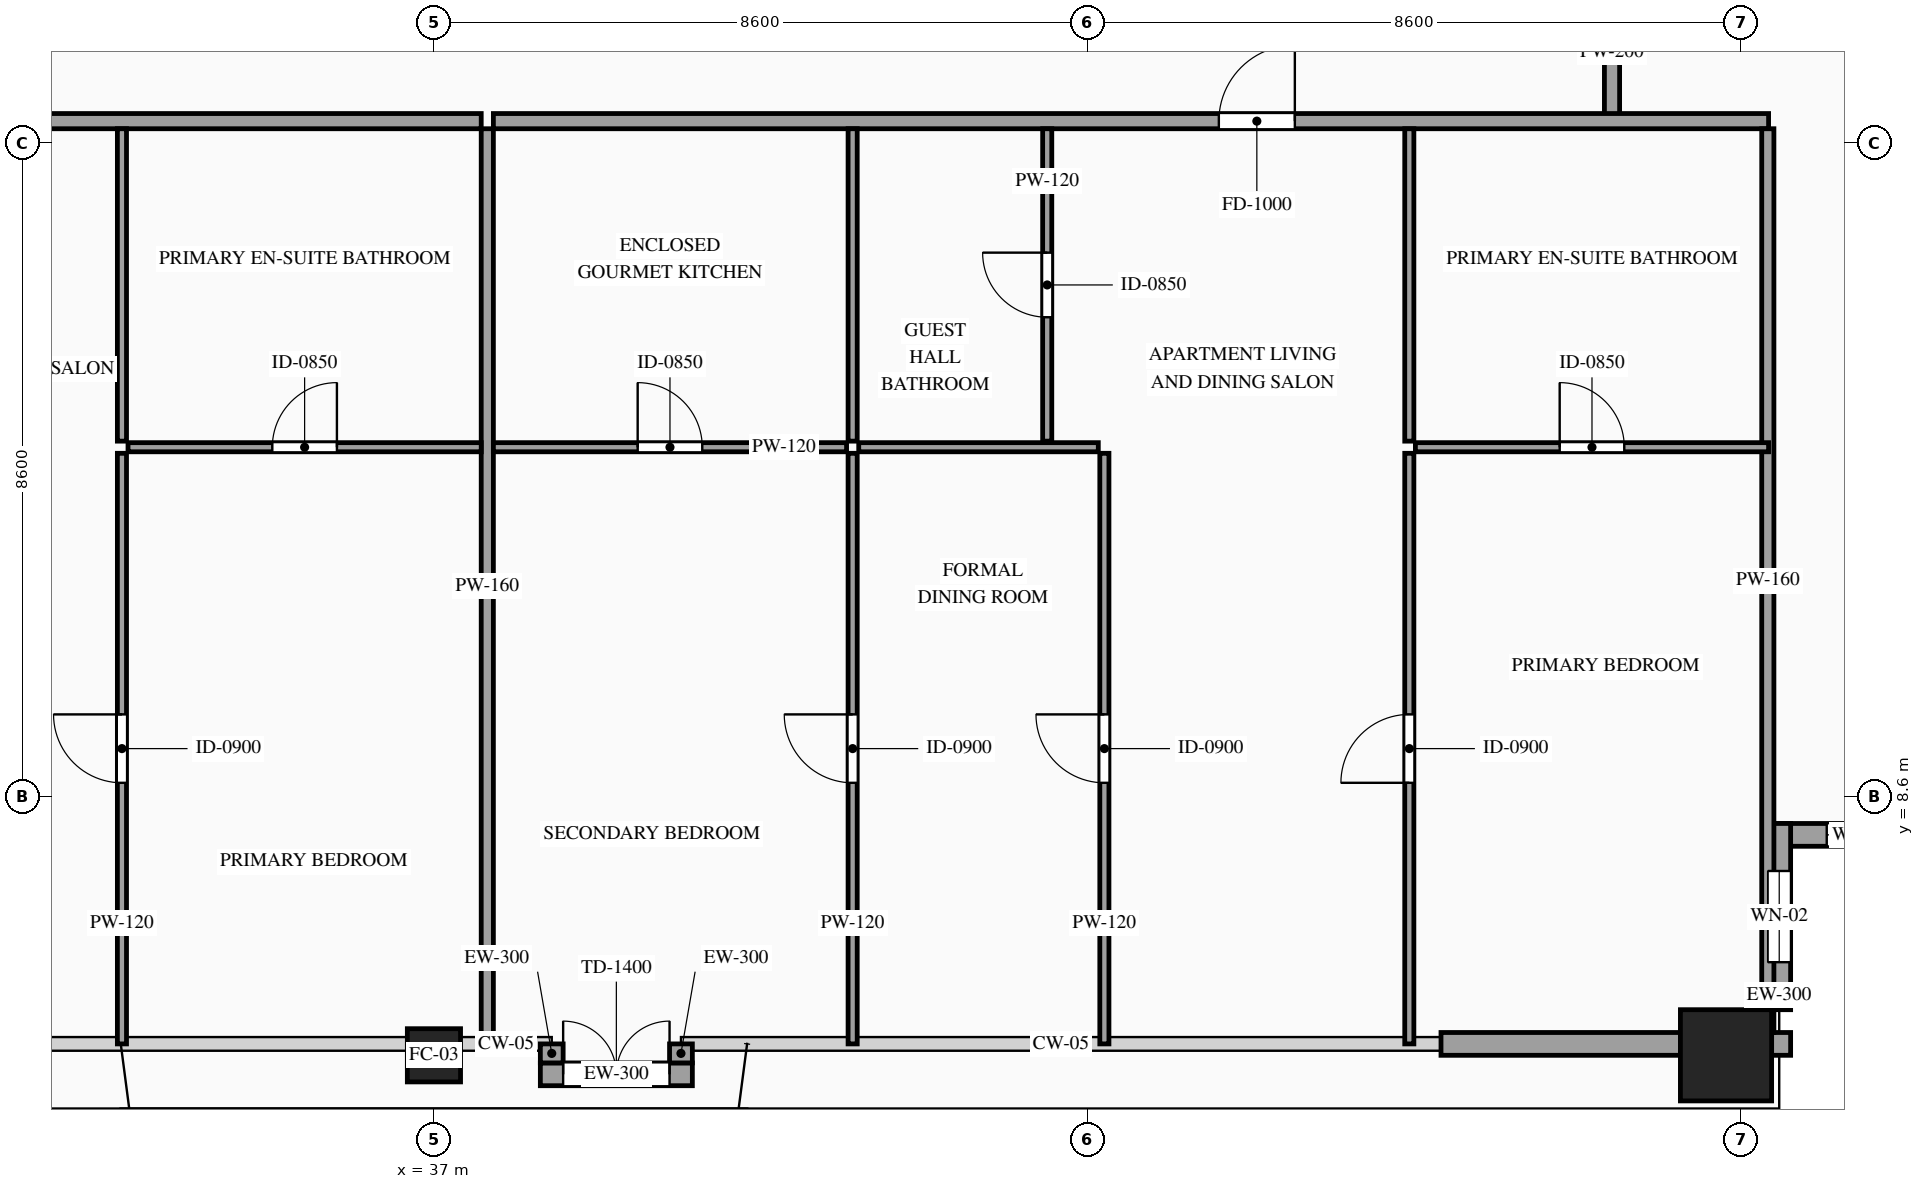
"""IFC4 building model, lengths in metres.
Left out: names, types, materials, properties, quantities, classifications, styles, units other than length and angle.
Written with IfcOpenShell. Run it as: python <this file> out.ifc"""

import sys

from ifc_helpers import new_model, si_unit, direction, frame, frame_2d, origin, origin_2d, place, context, subcontext, project, spatial, rectangle, hollow_rectangle, extrude, source, transform, mapped, element, fill, save


model = new_model("IFC4")
c1 = context("Model", 3, precision=1e-05, world=origin(), true_north=direction((0.0, 1.0)))
c2 = subcontext(c1, "Body", "Model", "MODEL_VIEW")
j1 = project(units=[si_unit("LENGTHUNIT", "METRE"), si_unit("PLANEANGLEUNIT", "RADIAN")], contexts=[c1])
p1 = place(None, origin())
s1 = spatial("IfcSite", under=j1, at=p1, CompositionType="ELEMENT")
p2 = place(p1, origin())
s2 = spatial("IfcBuilding", under=s1, at=p2, CompositionType="ELEMENT")
p3 = place(p2, frame((0.0, 0.0, 278.6)))
s3 = spatial("IfcBuildingStorey", under=s2, at=p3, CompositionType="ELEMENT", Elevation=278.6)
m1 = source(origin(), c2, "Body", "SweptSolid", [
    extrude(hollow_rectangle(XDim=0.7, YDim=0.7, WallThickness=0.032, at=origin_2d()), origin(), (0.0, 0.0, 1.0), 3.5),
])
p4 = place(p3, frame((37.0, 5.2, 0.0), z_axis=(0.0, 0.0, 1.0), x_axis=(1.0, 0.0, 0.0)))
e1 = element("IfcColumn", 1, at=p4, inside=s3, PredefinedType="COLUMN", context=c2, shape_type="MappedRepresentation", body=[
    mapped(m1, transform((0.0, 0.0, 0.0), scale=1.0)),
])
m2 = source(origin(), c2, "Body", "SweptSolid", [
    extrude(hollow_rectangle(XDim=1.2, YDim=1.2, WallThickness=0.055, at=origin_2d()), origin(), (0.0, 0.0, 1.0), 3.5),
])
p5 = place(p3, frame((54.0, 5.2, 0.0), z_axis=(0.0, 0.0, 1.0), x_axis=(1.0, 0.0, 0.0)))
e2 = element("IfcColumn", 2, at=p5, inside=s3, PredefinedType="COLUMN", context=c2, shape_type="MappedRepresentation", body=[
    mapped(m2, transform((0.0, 0.0, 0.0), scale=1.0)),
])
p6 = place(p3, frame((54.55, 8.1, 0.0), z_axis=(0.0, 0.0, 1.0), x_axis=(1.0, 0.0, 0.0)))
e3 = element("IfcWall", 3, at=p6, inside=s3, PredefinedType="SOLIDWALL", context=c2, shape_type="SweptSolid", body=[
    extrude(rectangle(XDim=2.45, YDim=0.3, at=frame_2d((1.225, 0.0))), origin(), (0.0, 0.0, 1.0), 3.28),
])
p7 = place(p6, frame((0.775, 0.0, 0.85)))
e4 = element("IfcOpeningElement", 4, at=p7, cuts=e3, PredefinedType="OPENING", context=c2, shape_type="SweptSolid", body=[
    extrude(rectangle(XDim=0.9, YDim=1.5, at=frame_2d((0.45, 0.75))), frame((0.0, 0.165, 0.0), z_axis=(0.0, -1.0, 0.0), x_axis=(1.0, 0.0, 0.0)), (0.0, 0.0, 1.0), 0.33),
])
p8 = place(p3, frame((54.7, 5.8, 0.0), z_axis=(0.0, 0.0, 1.0), x_axis=(0.0, 1.0, 0.0)))
e5 = element("IfcWall", 5, at=p8, inside=s3, PredefinedType="SOLIDWALL", context=c2, shape_type="SweptSolid", body=[
    extrude(rectangle(XDim=2.45, YDim=0.3, at=frame_2d((1.225, 0.0))), origin(), (0.0, 0.0, 1.0), 3.28),
])
p9 = place(p8, frame((0.625, 0.0, 0.85)))
e6 = element("IfcOpeningElement", 6, at=p9, cuts=e5, PredefinedType="OPENING", context=c2, shape_type="SweptSolid", body=[
    extrude(rectangle(XDim=1.2, YDim=2.1, at=frame_2d((0.6, 1.05))), frame((0.0, 0.165, 0.0), z_axis=(0.0, -1.0, 0.0), x_axis=(1.0, 0.0, 0.0)), (0.0, 0.0, 1.0), 0.33),
])
m3 = source(origin(), c2, "Body", "SweptSolid", [
    extrude(rectangle(XDim=0.25, YDim=0.3, at=frame_2d((0.125, 0.0))), origin(), (0.0, 0.0, 1.0), 3.28),
])
p10 = place(p3, frame((54.6, 5.35, 0.0), z_axis=(0.0, 0.0, 1.0), x_axis=(1.0, 0.0, 0.0)))
e7 = element("IfcWall", 7, at=p10, inside=s3, PredefinedType="SOLIDWALL", context=c2, shape_type="MappedRepresentation", body=[
    mapped(m3, transform((0.0, 0.0, 0.0), scale=1.0)),
])
m4 = source(origin(), c2, "Body", "SweptSolid", [
    extrude(rectangle(XDim=3.15, YDim=0.3, at=frame_2d((1.575, 0.0))), origin(), (0.0, 0.0, 1.0), 2.835),
])
p11 = place(p3, frame((50.25, 5.35, 0.0), z_axis=(0.0, 0.0, 1.0), x_axis=(1.0, 0.0, 0.0)))
e8 = element("IfcWall", 8, at=p11, inside=s3, PredefinedType="SOLIDWALL", context=c2, shape_type="MappedRepresentation", body=[
    mapped(m4, transform((0.0, 0.0, 0.0), scale=1.0)),
])
p12 = place(p3, frame((38.4, 4.95, 0.0), z_axis=(0.0, 0.0, 1.0), x_axis=(1.0, 0.0, 0.0)))
e9 = element("IfcWall", 9, at=p12, inside=s3, PredefinedType="SOLIDWALL", context=c2, shape_type="SweptSolid", body=[
    extrude(rectangle(XDim=2.0, YDim=0.3, at=frame_2d((1.0, 0.0))), origin(), (0.0, 0.0, 1.0), 2.835),
])
p13 = place(p12, frame((0.3, 0.0, 0.0)))
e10 = element("IfcOpeningElement", 10, at=p13, cuts=e9, PredefinedType="OPENING", context=c2, shape_type="SweptSolid", body=[
    extrude(rectangle(XDim=1.4, YDim=2.3, at=frame_2d((0.7, 1.15))), frame((0.0, 0.165, 0.0), z_axis=(0.0, -1.0, 0.0), x_axis=(1.0, 0.0, 0.0)), (0.0, 0.0, 1.0), 0.33),
])
for number, where, z_axis, x_axis in (
    (11, (38.55, 5.35, 0.0), (0.0, 0.0, 1.0), (0.0, -1.0, 0.0)),
    (12, (40.25, 5.1, 0.0), (0.0, 0.0, 1.0), (0.0, 1.0, 0.0)),
):
    element("IfcWall", number, at=place(p3, frame(where, z_axis=z_axis, x_axis=x_axis)), inside=s3, PredefinedType="SOLIDWALL", context=c2, shape_type="MappedRepresentation", body=[
        mapped(m3, transform((0.0, 0.0, 0.0), scale=1.0)),
    ])
m5 = source(origin(), c2, "Body", "SweptSolid", [
    extrude(rectangle(XDim=1.7, YDim=0.2, at=frame_2d((0.85, 0.0))), origin(), (0.0, 0.0, 1.0), 3.28),
])
p14 = place(p3, frame((52.5, 17.55, 0.0), z_axis=(0.0, 0.0, 1.0), x_axis=(0.0, 1.0, 0.0)))
e13 = element("IfcWall", 13, at=p14, inside=s3, PredefinedType="PARTITIONING", context=c2, shape_type="MappedRepresentation", body=[
    mapped(m5, transform((0.0, 0.0, 0.0), scale=1.0)),
])
p15 = place(p3, frame((19.44, 17.49, 0.0), z_axis=(0.0, 0.0, 1.0), x_axis=(1.0, 0.0, 0.0)))
e14 = element("IfcWall", 14, at=p15, inside=s3, PredefinedType="PARTITIONING", context=c2, shape_type="SweptSolid", body=[
    extrude(rectangle(XDim=18.182, YDim=0.2, at=frame_2d((9.091, 0.0))), origin(), (0.0, 0.0, 1.0), 3.28),
])
p16 = place(p15, frame((10.528, 0.0, 0.0)))
e15 = element("IfcOpeningElement", 15, at=p16, cuts=e14, PredefinedType="OPENING", context=c2, shape_type="SweptSolid", body=[
    extrude(rectangle(XDim=1.0, YDim=2.2, at=frame_2d((0.5, 1.1))), frame((0.0, 0.115, 0.0), z_axis=(0.0, -1.0, 0.0), x_axis=(1.0, 0.0, 0.0)), (0.0, 0.0, 1.0), 0.23),
])
m6 = source(origin(), c2, "Body", "SweptSolid", [
    extrude(rectangle(XDim=12.04, YDim=0.16, at=frame_2d((6.02, 0.0))), origin(), (0.0, 0.0, 1.0), 3.28),
])
p17 = place(p3, frame((37.702, 5.35, 0.0), z_axis=(0.0, 0.0, 1.0), x_axis=(0.0, 1.0, 0.0)))
e16 = element("IfcWall", 16, at=p17, inside=s3, PredefinedType="PARTITIONING", context=c2, shape_type="MappedRepresentation", body=[
    mapped(m6, transform((0.0, 0.0, 0.0), scale=1.0)),
])
p18 = place(p3, frame((32.975, 13.2, 0.0), z_axis=(0.0, 0.0, 1.0), x_axis=(1.0, 0.0, 0.0)))
e17 = element("IfcWall", 17, at=p18, inside=s3, PredefinedType="PARTITIONING", context=c2, shape_type="SweptSolid", body=[
    extrude(rectangle(XDim=4.647, YDim=0.12, at=frame_2d((2.323, 0.0))), origin(), (0.0, 0.0, 1.0), 3.28),
])
p19 = place(p18, frame((1.898, 0.0, 0.0)))
e18 = element("IfcOpeningElement", 18, at=p19, cuts=e17, PredefinedType="OPENING", context=c2, shape_type="SweptSolid", body=[
    extrude(rectangle(XDim=0.85, YDim=2.1, at=frame_2d((0.425, 1.05))), frame((0.0, 0.075, 0.0), z_axis=(0.0, -1.0, 0.0), x_axis=(1.0, 0.0, 0.0)), (0.0, 0.0, 1.0), 0.15),
])
m7 = source(origin(), c2, "Body", "SweptSolid", [
    extrude(rectangle(XDim=4.11, YDim=0.12, at=frame_2d((2.055, 0.0))), origin(), (0.0, 0.0, 1.0), 3.28),
])
p20 = place(p3, frame((32.895, 13.28, 0.0), z_axis=(0.0, 0.0, 1.0), x_axis=(0.0, 1.0, 0.0)))
e19 = element("IfcWall", 19, at=p20, inside=s3, PredefinedType="PARTITIONING", context=c2, shape_type="MappedRepresentation", body=[
    mapped(m7, transform((0.0, 0.0, 0.0), scale=1.0)),
])
p21 = place(p3, frame((32.895, 5.35, 0.0), z_axis=(0.0, 0.0, 1.0), x_axis=(0.0, 1.0, 0.0)))
e20 = element("IfcWall", 20, at=p21, inside=s3, PredefinedType="PARTITIONING", context=c2, shape_type="SweptSolid", body=[
    extrude(rectangle(XDim=7.77, YDim=0.12, at=frame_2d((3.885, 0.0))), origin(), (0.0, 0.0, 1.0), 3.28),
])
p22 = place(p21, frame((3.435, 0.0, 0.0)))
e21 = element("IfcOpeningElement", 21, at=p22, cuts=e20, PredefinedType="OPENING", context=c2, shape_type="SweptSolid", body=[
    extrude(rectangle(XDim=0.9, YDim=2.15, at=frame_2d((0.45, 1.075))), frame((0.0, 0.075, 0.0), z_axis=(0.0, -1.0, 0.0), x_axis=(1.0, 0.0, 0.0)), (0.0, 0.0, 1.0), 0.15),
])
p23 = place(p3, frame((37.782, 17.49, 0.0), z_axis=(0.0, 0.0, 1.0), x_axis=(1.0, 0.0, 0.0)))
e22 = element("IfcWall", 22, at=p23, inside=s3, PredefinedType="PARTITIONING", context=c2, shape_type="SweptSolid", body=[
    extrude(rectangle(XDim=16.778, YDim=0.2, at=frame_2d((8.389, 0.0))), origin(), (0.0, 0.0, 1.0), 3.28),
])
p24 = place(p23, frame((9.545, 0.0, 0.0)))
e23 = element("IfcOpeningElement", 23, at=p24, cuts=e22, PredefinedType="OPENING", context=c2, shape_type="SweptSolid", body=[
    extrude(rectangle(XDim=1.0, YDim=2.2, at=frame_2d((0.5, 1.1))), frame((0.0, 0.115, 0.0), z_axis=(0.0, -1.0, 0.0), x_axis=(1.0, 0.0, 0.0)), (0.0, 0.0, 1.0), 0.23),
])
m8 = source(origin(), c2, "Body", "SweptSolid", [
    extrude(rectangle(XDim=11.89, YDim=0.16, at=frame_2d((5.945, 0.0))), origin(), (0.0, 0.0, 1.0), 3.28),
])
p25 = place(p3, frame((54.55, 5.5, 0.0), z_axis=(0.0, 0.0, 1.0), x_axis=(0.0, 1.0, 0.0)))
e24 = element("IfcWall", 24, at=p25, inside=s3, PredefinedType="PARTITIONING", context=c2, shape_type="MappedRepresentation", body=[
    mapped(m8, transform((0.0, 0.0, 0.0), scale=1.0)),
])
p26 = place(p3, frame((37.782, 13.2, 0.0), z_axis=(0.0, 0.0, 1.0), x_axis=(1.0, 0.0, 0.0)))
e25 = element("IfcWall", 25, at=p26, inside=s3, PredefinedType="PARTITIONING", context=c2, shape_type="SweptSolid", body=[
    extrude(rectangle(XDim=4.647, YDim=0.12, at=frame_2d((2.323, 0.0))), origin(), (0.0, 0.0, 1.0), 3.28),
])
p27 = place(p26, frame((1.898, 0.0, 0.0)))
e26 = element("IfcOpeningElement", 26, at=p27, cuts=e25, PredefinedType="OPENING", context=c2, shape_type="SweptSolid", body=[
    extrude(rectangle(XDim=0.85, YDim=2.1, at=frame_2d((0.425, 1.05))), frame((0.0, 0.075, 0.0), z_axis=(0.0, -1.0, 0.0), x_axis=(1.0, 0.0, 0.0)), (0.0, 0.0, 1.0), 0.15),
])
p28 = place(p3, frame((42.509, 13.28, 0.0), z_axis=(0.0, 0.0, 1.0), x_axis=(0.0, 1.0, 0.0)))
e27 = element("IfcWall", 27, at=p28, inside=s3, PredefinedType="PARTITIONING", context=c2, shape_type="MappedRepresentation", body=[
    mapped(m7, transform((0.0, 0.0, 0.0), scale=1.0)),
])
p29 = place(p3, frame((45.069, 13.28, 0.0), z_axis=(0.0, 0.0, 1.0), x_axis=(0.0, 1.0, 0.0)))
e28 = element("IfcWall", 28, at=p29, inside=s3, PredefinedType="PARTITIONING", context=c2, shape_type="SweptSolid", body=[
    extrude(rectangle(XDim=4.11, YDim=0.12, at=frame_2d((2.055, 0.0))), origin(), (0.0, 0.0, 1.0), 3.28),
])
p30 = place(p29, frame((1.63, 0.0, 0.0)))
e29 = element("IfcOpeningElement", 29, at=p30, cuts=e28, PredefinedType="OPENING", context=c2, shape_type="SweptSolid", body=[
    extrude(rectangle(XDim=0.85, YDim=2.1, at=frame_2d((0.425, 1.05))), frame((0.0, 0.075, 0.0), z_axis=(0.0, -1.0, 0.0), x_axis=(1.0, 0.0, 0.0)), (0.0, 0.0, 1.0), 0.15),
])
p31 = place(p3, frame((49.913, 13.2, 0.0), z_axis=(0.0, 0.0, 1.0), x_axis=(1.0, 0.0, 0.0)))
e30 = element("IfcWall", 30, at=p31, inside=s3, PredefinedType="PARTITIONING", context=c2, shape_type="SweptSolid", body=[
    extrude(rectangle(XDim=4.647, YDim=0.12, at=frame_2d((2.323, 0.0))), origin(), (0.0, 0.0, 1.0), 3.28),
])
p32 = place(p31, frame((1.898, 0.0, 0.0)))
e31 = element("IfcOpeningElement", 31, at=p32, cuts=e30, PredefinedType="OPENING", context=c2, shape_type="SweptSolid", body=[
    extrude(rectangle(XDim=0.85, YDim=2.1, at=frame_2d((0.425, 1.05))), frame((0.0, 0.075, 0.0), z_axis=(0.0, -1.0, 0.0), x_axis=(1.0, 0.0, 0.0)), (0.0, 0.0, 1.0), 0.15),
])
p33 = place(p3, frame((49.833, 13.28, 0.0), z_axis=(0.0, 0.0, 1.0), x_axis=(0.0, 1.0, 0.0)))
e32 = element("IfcWall", 32, at=p33, inside=s3, PredefinedType="PARTITIONING", context=c2, shape_type="MappedRepresentation", body=[
    mapped(m7, transform((0.0, 0.0, 0.0), scale=1.0)),
])
p34 = place(p3, frame((42.509, 5.35, 0.0), z_axis=(0.0, 0.0, 1.0), x_axis=(0.0, 1.0, 0.0)))
e33 = element("IfcWall", 33, at=p34, inside=s3, PredefinedType="PARTITIONING", context=c2, shape_type="SweptSolid", body=[
    extrude(rectangle(XDim=7.77, YDim=0.12, at=frame_2d((3.885, 0.0))), origin(), (0.0, 0.0, 1.0), 3.28),
])
p35 = place(p34, frame((3.435, 0.0, 0.0)))
e34 = element("IfcOpeningElement", 34, at=p35, cuts=e33, PredefinedType="OPENING", context=c2, shape_type="SweptSolid", body=[
    extrude(rectangle(XDim=0.9, YDim=2.15, at=frame_2d((0.45, 1.075))), frame((0.0, 0.075, 0.0), z_axis=(0.0, -1.0, 0.0), x_axis=(1.0, 0.0, 0.0)), (0.0, 0.0, 1.0), 0.15),
])
p36 = place(p3, frame((49.833, 5.35, 0.0), z_axis=(0.0, 0.0, 1.0), x_axis=(0.0, 1.0, 0.0)))
e35 = element("IfcWall", 35, at=p36, inside=s3, PredefinedType="PARTITIONING", context=c2, shape_type="SweptSolid", body=[
    extrude(rectangle(XDim=7.77, YDim=0.12, at=frame_2d((3.885, 0.0))), origin(), (0.0, 0.0, 1.0), 3.28),
])
p37 = place(p36, frame((3.435, 0.0, 0.0)))
e36 = element("IfcOpeningElement", 36, at=p37, cuts=e35, PredefinedType="OPENING", context=c2, shape_type="SweptSolid", body=[
    extrude(rectangle(XDim=0.9, YDim=2.15, at=frame_2d((0.45, 1.075))), frame((0.0, 0.075, 0.0), z_axis=(0.0, -1.0, 0.0), x_axis=(1.0, 0.0, 0.0)), (0.0, 0.0, 1.0), 0.15),
])
m9 = source(origin(), c2, "Body", "SweptSolid", [
    extrude(rectangle(XDim=3.152, YDim=0.12, at=frame_2d((1.576, 0.0))), origin(), (0.0, 0.0, 1.0), 3.28),
])
p38 = place(p3, frame((42.589, 13.2, 0.0), z_axis=(0.0, 0.0, 1.0), x_axis=(1.0, 0.0, 0.0)))
e37 = element("IfcWall", 37, at=p38, inside=s3, PredefinedType="PARTITIONING", context=c2, shape_type="MappedRepresentation", body=[
    mapped(m9, transform((0.0, 0.0, 0.0), scale=1.0)),
])
p39 = place(p3, frame((45.821, 5.35, 0.0), z_axis=(0.0, 0.0, 1.0), x_axis=(0.0, 1.0, 0.0)))
e38 = element("IfcWall", 38, at=p39, inside=s3, PredefinedType="PARTITIONING", context=c2, shape_type="SweptSolid", body=[
    extrude(rectangle(XDim=7.77, YDim=0.12, at=frame_2d((3.885, 0.0))), origin(), (0.0, 0.0, 1.0), 3.28),
])
p40 = place(p39, frame((3.435, 0.0, 0.0)))
e39 = element("IfcOpeningElement", 39, at=p40, cuts=e38, PredefinedType="OPENING", context=c2, shape_type="SweptSolid", body=[
    extrude(rectangle(XDim=0.9, YDim=2.15, at=frame_2d((0.45, 1.075))), frame((0.0, 0.075, 0.0), z_axis=(0.0, -1.0, 0.0), x_axis=(1.0, 0.0, 0.0)), (0.0, 0.0, 1.0), 0.15),
])
m10 = source(origin(), c2, "Body", "SweptSolid", [
    extrude(rectangle(XDim=0.9, YDim=1.5, at=frame_2d((0.45, 0.75))), frame((0.0, 0.03, 0.0), z_axis=(0.0, -1.0, 0.0), x_axis=(1.0, 0.0, 0.0)), (0.0, 0.0, 1.0), 0.06),
])
p41 = place(p7, origin())
e40 = element("IfcWindow", 40, at=p41, inside=s3, PartitioningType="SINGLE_PANEL", PredefinedType="WINDOW", context=c2, shape_type="MappedRepresentation", body=[
    mapped(m10, transform((0.0, 0.0, 0.0), scale=1.0)),
])
fill(e4, e40)
m11 = source(origin(), c2, "Body", "SweptSolid", [
    extrude(rectangle(XDim=1.2, YDim=2.1, at=frame_2d((0.6, 1.05))), frame((0.0, 0.03, 0.0), z_axis=(0.0, -1.0, 0.0), x_axis=(1.0, 0.0, 0.0)), (0.0, 0.0, 1.0), 0.06),
])
p42 = place(p9, origin())
e41 = element("IfcWindow", 41, at=p42, inside=s3, PartitioningType="SINGLE_PANEL", PredefinedType="WINDOW", context=c2, shape_type="MappedRepresentation", body=[
    mapped(m11, transform((0.0, 0.0, 0.0), scale=1.0)),
])
fill(e6, e41)
m12 = source(origin(), c2, "Body", "SweptSolid", [
    extrude(rectangle(XDim=1.4, YDim=2.3, at=frame_2d((0.7, 1.15))), frame((0.0, 0.025, 0.0), z_axis=(0.0, -1.0, 0.0), x_axis=(1.0, 0.0, 0.0)), (0.0, 0.0, 1.0), 0.05),
])
p43 = place(p13, origin())
e42 = element("IfcDoor", 42, at=p43, inside=s3, OperationType="DOUBLE_DOOR_SINGLE_SWING", PredefinedType="DOOR", context=c2, shape_type="MappedRepresentation", body=[
    mapped(m12, transform((0.0, 0.0, 0.0), scale=1.0)),
])
fill(e10, e42)
m13 = source(origin(), c2, "Body", "SweptSolid", [
    extrude(rectangle(XDim=0.85, YDim=2.1, at=frame_2d((0.425, 1.05))), frame((0.0, 0.025, 0.0), z_axis=(0.0, -1.0, 0.0), x_axis=(1.0, 0.0, 0.0)), (0.0, 0.0, 1.0), 0.05),
])
p44 = place(p19, origin())
e43 = element("IfcDoor", 43, at=p44, inside=s3, OperationType="SINGLE_SWING_RIGHT", PredefinedType="DOOR", context=c2, shape_type="MappedRepresentation", body=[
    mapped(m13, transform((0.0, 0.0, 0.0), scale=1.0)),
])
fill(e18, e43)
m14 = source(origin(), c2, "Body", "SweptSolid", [
    extrude(rectangle(XDim=0.9, YDim=2.15, at=frame_2d((0.45, 1.075))), frame((0.0, 0.025, 0.0), z_axis=(0.0, -1.0, 0.0), x_axis=(1.0, 0.0, 0.0)), (0.0, 0.0, 1.0), 0.05),
])
p45 = place(p22, origin())
e44 = element("IfcDoor", 44, at=p45, inside=s3, OperationType="SINGLE_SWING_RIGHT", PredefinedType="DOOR", context=c2, shape_type="MappedRepresentation", body=[
    mapped(m14, transform((0.0, 0.0, 0.0), scale=1.0)),
])
fill(e21, e44)
m15 = source(origin(), c2, "Body", "SweptSolid", [
    extrude(rectangle(XDim=1.0, YDim=2.2, at=frame_2d((0.5, 1.1))), frame((0.0, 0.025, 0.0), z_axis=(0.0, -1.0, 0.0), x_axis=(1.0, 0.0, 0.0)), (0.0, 0.0, 1.0), 0.05),
])
p46 = place(p24, origin())
e45 = element("IfcDoor", 45, at=p46, inside=s3, OperationType="SINGLE_SWING_RIGHT", PredefinedType="DOOR", context=c2, shape_type="MappedRepresentation", body=[
    mapped(m15, transform((0.0, 0.0, 0.0), scale=1.0)),
])
fill(e23, e45)
p47 = place(p27, origin())
e46 = element("IfcDoor", 46, at=p47, inside=s3, OperationType="SINGLE_SWING_LEFT", PredefinedType="DOOR", context=c2, shape_type="MappedRepresentation", body=[
    mapped(m13, transform((0.0, 0.0, 0.0), scale=1.0)),
])
fill(e26, e46)
p48 = place(p30, origin())
e47 = element("IfcDoor", 47, at=p48, inside=s3, OperationType="SINGLE_SWING_RIGHT", PredefinedType="DOOR", context=c2, shape_type="MappedRepresentation", body=[
    mapped(m13, transform((0.0, 0.0, 0.0), scale=1.0)),
])
fill(e29, e47)
p49 = place(p32, origin())
e48 = element("IfcDoor", 48, at=p49, inside=s3, OperationType="SINGLE_SWING_LEFT", PredefinedType="DOOR", context=c2, shape_type="MappedRepresentation", body=[
    mapped(m13, transform((0.0, 0.0, 0.0), scale=1.0)),
])
fill(e31, e48)
p50 = place(p35, origin())
e49 = element("IfcDoor", 49, at=p50, inside=s3, OperationType="SINGLE_SWING_RIGHT", PredefinedType="DOOR", context=c2, shape_type="MappedRepresentation", body=[
    mapped(m14, transform((0.0, 0.0, 0.0), scale=1.0)),
])
fill(e34, e49)
p51 = place(p37, origin())
e50 = element("IfcDoor", 50, at=p51, inside=s3, OperationType="SINGLE_SWING_LEFT", PredefinedType="DOOR", context=c2, shape_type="MappedRepresentation", body=[
    mapped(m14, transform((0.0, 0.0, 0.0), scale=1.0)),
])
fill(e36, e50)
p52 = place(p40, origin())
e51 = element("IfcDoor", 51, at=p52, inside=s3, OperationType="SINGLE_SWING_RIGHT", PredefinedType="DOOR", context=c2, shape_type="MappedRepresentation", body=[
    mapped(m14, transform((0.0, 0.0, 0.0), scale=1.0)),
])
fill(e39, e51)
save(model, sys.argv[1])
